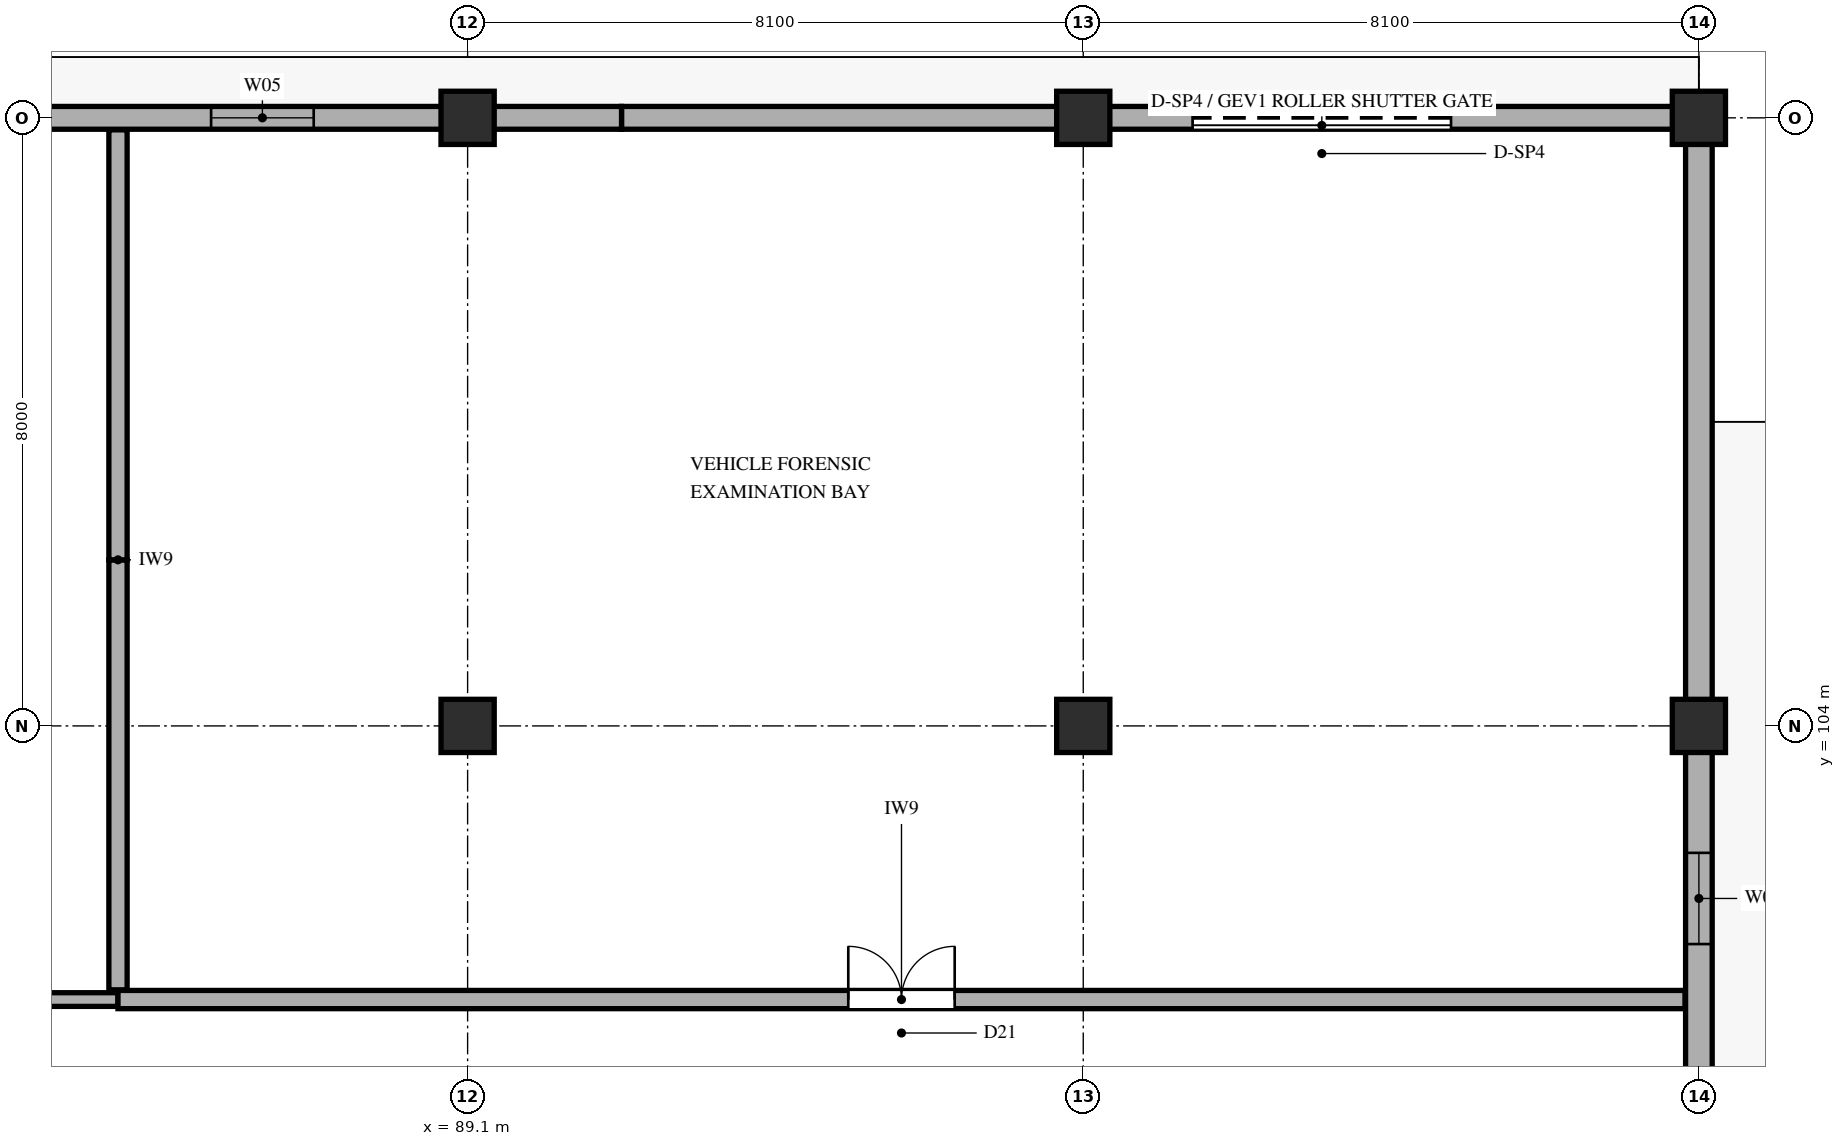
"""IFC4 building model, lengths in metres.
Left out: names, types, materials, properties, quantities, classifications, styles, units other than length and angle.
Written with IfcOpenShell. Run it as: python <this file> out.ifc"""

import sys

from ifc_helpers import new_model, si_unit, direction, frame, frame_2d, origin, origin_2d, place, context, subcontext, project, spatial, rectangle, extrude, element, fill, save


model = new_model("IFC4")
c1 = context("Model", 3, precision=1e-05, world=origin(), true_north=direction((0.0, 1.0)))
c2 = subcontext(c1, "Body", "Model", "MODEL_VIEW")
j1 = project(units=[si_unit("LENGTHUNIT", "METRE"), si_unit("PLANEANGLEUNIT", "RADIAN")], contexts=[c1])
p1 = place(None, origin())
s1 = spatial("IfcSite", under=j1, at=p1, CompositionType="ELEMENT")
p2 = place(p1, origin())
s2 = spatial("IfcBuilding", under=s1, at=p2, CompositionType="ELEMENT")
p3 = place(p2, origin())
s3 = spatial("IfcBuildingStorey", under=s2, at=p3, CompositionType="ELEMENT", Elevation=0.0)
for number, where, z_axis, x_axis in (
    (1, (89.1, 104.0, 0.0), (0.0, 0.0, 1.0), (1.0, 0.0, 0.0)),
    (2, (89.1, 112.0, 0.0), (0.0, 0.0, 1.0), (1.0, 0.0, 0.0)),
    (3, (97.2, 104.0, 0.0), (0.0, 0.0, 1.0), (1.0, 0.0, 0.0)),
    (4, (97.2, 112.0, 0.0), (0.0, 0.0, 1.0), (1.0, 0.0, 0.0)),
    (5, (105.3, 104.0, 0.0), (0.0, 0.0, 1.0), (1.0, 0.0, 0.0)),
    (6, (105.3, 112.0, 0.0), (0.0, 0.0, 1.0), (1.0, 0.0, 0.0)),
):
    element("IfcColumn", number, at=place(p3, frame(where, z_axis=z_axis, x_axis=x_axis)), inside=s3, PredefinedType="COLUMN", context=c2, shape_type="SweptSolid", body=[
        extrude(rectangle(XDim=0.7, YDim=0.7, at=origin_2d()), origin(), (0.0, 0.0, 1.0), 5.4),
    ])
p4 = place(p3, frame((105.3, 96.18, 0.0), z_axis=(0.0, 0.0, 1.0), x_axis=(0.0, 1.0, 0.0)))
e7 = element("IfcWall", 7, at=p4, inside=s3, PredefinedType="SOLIDWALL", context=c2, shape_type="SweptSolid", body=[
    extrude(rectangle(XDim=15.82, YDim=0.35, at=frame_2d((7.91, 0.0))), origin(), (0.0, 0.0, 1.0), 4.512),
])
p5 = place(p4, frame((4.95, 0.0, 0.95)))
e8 = element("IfcOpeningElement", 8, at=p5, cuts=e7, PredefinedType="OPENING", context=c2, shape_type="SweptSolid", body=[
    extrude(rectangle(XDim=1.2, YDim=1.8, at=frame_2d((0.6, 0.9))), frame((0.0, 0.185, 0.0), z_axis=(0.0, -1.0, 0.0), x_axis=(1.0, 0.0, 0.0)), (0.0, 0.0, 1.0), 0.37),
])
p6 = place(p3, frame((105.3, 112.0, 0.0), z_axis=(0.0, 0.0, 1.0), x_axis=(-1.0, 0.0, 0.0)))
e9 = element("IfcWall", 9, at=p6, inside=s3, PredefinedType="SOLIDWALL", context=c2, shape_type="SweptSolid", body=[
    extrude(rectangle(XDim=14.175, YDim=0.3, at=frame_2d((7.087, 0.0))), origin(), (0.0, 0.0, 1.0), 4.412),
])
p7 = place(p6, frame((3.261, 0.0, 0.0)))
e10 = element("IfcOpeningElement", 10, at=p7, cuts=e9, PredefinedType="OPENING", context=c2, shape_type="SweptSolid", body=[
    extrude(rectangle(XDim=3.4, YDim=3.1, at=frame_2d((1.7, 1.55))), frame((0.0, 0.16, 0.0), z_axis=(0.0, -1.0, 0.0), x_axis=(1.0, 0.0, 0.0)), (0.0, 0.0, 1.0), 0.32),
])
p8 = place(p3, frame((91.125, 112.0, 0.0), z_axis=(0.0, 0.0, 1.0), x_axis=(-1.0, 0.0, 0.0)))
e11 = element("IfcWall", 11, at=p8, inside=s3, PredefinedType="SOLIDWALL", context=c2, shape_type="SweptSolid", body=[
    extrude(rectangle(XDim=14.175, YDim=0.3, at=frame_2d((7.087, 0.0))), origin(), (0.0, 0.0, 1.0), 4.412),
])
p9 = place(p8, frame((4.05, 0.0, 0.95)))
e12 = element("IfcOpeningElement", 12, at=p9, cuts=e11, PredefinedType="OPENING", context=c2, shape_type="SweptSolid", body=[
    extrude(rectangle(XDim=1.35, YDim=1.8, at=frame_2d((0.675, 0.9))), frame((0.0, 0.16, 0.0), z_axis=(0.0, -1.0, 0.0), x_axis=(1.0, 0.0, 0.0)), (0.0, 0.0, 1.0), 0.32),
])
p10 = place(p3, frame((65.4, 100.4, 0.0), z_axis=(0.0, 0.0, 1.0), x_axis=(1.0, 0.0, 0.0)))
e13 = element("IfcWall", 13, at=p10, inside=s3, PredefinedType="PARTITIONING", context=c2, shape_type="SweptSolid", body=[
    extrude(rectangle(XDim=19.1, YDim=0.18, at=frame_2d((9.55, 0.0))), origin(), (0.0, 0.0, 1.0), 5.12),
])
p11 = place(p10, frame((8.95, 0.0, 0.0)))
e14 = element("IfcOpeningElement", 14, at=p11, cuts=e13, PredefinedType="OPENING", context=c2, shape_type="SweptSolid", body=[
    extrude(rectangle(XDim=1.2, YDim=2.3, at=frame_2d((0.6, 1.15))), frame((0.0, 0.1, 0.0), z_axis=(0.0, -1.0, 0.0), x_axis=(1.0, 0.0, 0.0)), (0.0, 0.0, 1.0), 0.2),
])
p12 = place(p3, frame((84.5, 100.4, 0.0), z_axis=(0.0, 0.0, 1.0), x_axis=(1.0, 0.0, 0.0)))
e15 = element("IfcWall", 15, at=p12, inside=s3, PredefinedType="PARTITIONING", context=c2, shape_type="SweptSolid", body=[
    extrude(rectangle(XDim=20.617, YDim=0.24, at=frame_2d((10.309, 0.0))), origin(), (0.0, 0.0, 1.0), 5.12),
])
p13 = place(p12, frame((9.608, 0.0, 0.0)))
e16 = element("IfcOpeningElement", 16, at=p13, cuts=e15, PredefinedType="OPENING", context=c2, shape_type="SweptSolid", body=[
    extrude(rectangle(XDim=1.4, YDim=2.35, at=frame_2d((0.7, 1.175))), frame((0.0, 0.13, 0.0), z_axis=(0.0, -1.0, 0.0), x_axis=(1.0, 0.0, 0.0)), (0.0, 0.0, 1.0), 0.26),
])
for number, where, z_axis, x_axis in (
    (17, (84.5, 100.528, 0.0), (0.0, 0.0, 1.0), (0.0, 1.0, 0.0)),
    (18, (84.5, 106.185, 0.0), (0.0, 0.0, 1.0), (0.0, 1.0, 0.0)),
):
    element("IfcWall", number, at=place(p3, frame(where, z_axis=z_axis, x_axis=x_axis)), inside=s3, PredefinedType="PARTITIONING", context=c2, shape_type="SweptSolid", body=[
        extrude(rectangle(XDim=5.657, YDim=0.24, at=frame_2d((2.829, 0.0))), origin(), (0.0, 0.0, 1.0), 5.12),
    ])
p14 = place(p5, origin())
e19 = element("IfcWindow", 19, at=p14, inside=s3, PartitioningType="SINGLE_PANEL", PredefinedType="WINDOW", context=c2, shape_type="SweptSolid", body=[
    extrude(rectangle(XDim=1.2, YDim=1.8, at=frame_2d((0.6, 0.9))), frame((0.0, 0.03, 0.0), z_axis=(0.0, -1.0, 0.0), x_axis=(1.0, 0.0, 0.0)), (0.0, 0.0, 1.0), 0.06),
])
fill(e8, e19)
p15 = place(p7, frame((3.4, 0.0, 0.0), z_axis=(0.0, 0.0, 1.0), x_axis=(-1.0, 0.0, 0.0)))
e20 = element("IfcDoor", 20, at=p15, inside=s3, OperationType="ROLLINGUP", PredefinedType="GATE", context=c2, shape_type="SweptSolid", body=[
    extrude(rectangle(XDim=3.4, YDim=3.1, at=frame_2d((1.7, 1.55))), frame((0.0, 0.025, 0.0), z_axis=(0.0, -1.0, 0.0), x_axis=(1.0, 0.0, 0.0)), (0.0, 0.0, 1.0), 0.05),
])
fill(e10, e20)
p16 = place(p9, origin())
e21 = element("IfcWindow", 21, at=p16, inside=s3, PartitioningType="DOUBLE_PANEL_VERTICAL", PredefinedType="WINDOW", context=c2, shape_type="SweptSolid", body=[
    extrude(rectangle(XDim=1.35, YDim=1.8, at=frame_2d((0.675, 0.9))), frame((0.0, 0.03, 0.0), z_axis=(0.0, -1.0, 0.0), x_axis=(1.0, 0.0, 0.0)), (0.0, 0.0, 1.0), 0.06),
])
fill(e12, e21)
p17 = place(p13, origin())
e22 = element("IfcDoor", 22, at=p17, inside=s3, OperationType="DOUBLE_DOOR_SINGLE_SWING", PredefinedType="DOOR", context=c2, shape_type="SweptSolid", body=[
    extrude(rectangle(XDim=1.4, YDim=2.35, at=frame_2d((0.7, 1.175))), frame((0.0, 0.025, 0.0), z_axis=(0.0, -1.0, 0.0), x_axis=(1.0, 0.0, 0.0)), (0.0, 0.0, 1.0), 0.05),
])
fill(e16, e22)
save(model, sys.argv[1])
